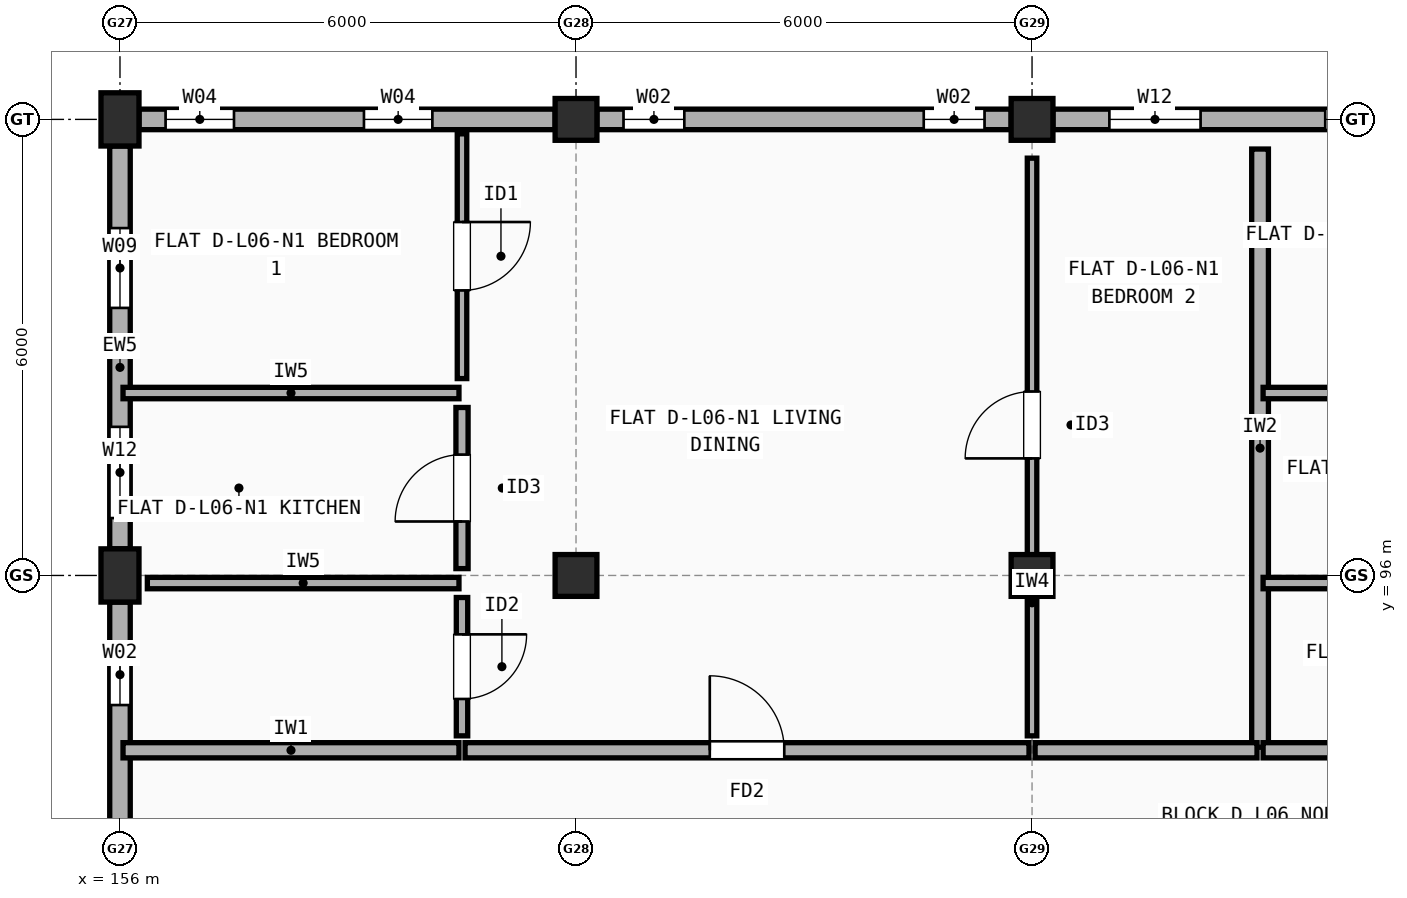
"""IFC4 building model, lengths in metres.
Left out: names, types, materials, properties, quantities, classifications, styles, units other than length and angle.
Written with IfcOpenShell. Run it as: python <this file> out.ifc"""

import sys

from ifc_helpers import new_model, si_unit, direction, frame, frame_2d, origin, origin_2d, place, context, subcontext, project, spatial, rectangle, extrude, element, fill, save


model = new_model("IFC4")
c1 = context("Model", 3, precision=1e-05, world=origin(), true_north=direction((0.0, 1.0)))
c2 = subcontext(c1, "Body", "Model", "MODEL_VIEW")
j1 = project(units=[si_unit("LENGTHUNIT", "METRE"), si_unit("PLANEANGLEUNIT", "RADIAN")], contexts=[c1])
p1 = place(None, origin())
s1 = spatial("IfcSite", under=j1, at=p1, CompositionType="ELEMENT")
p2 = place(p1, origin())
s2 = spatial("IfcBuilding", under=s1, at=p2, CompositionType="ELEMENT")
p3 = place(p2, frame((0.0, 0.0, 20.5)))
s3 = spatial("IfcBuildingStorey", under=s2, at=p3, CompositionType="ELEMENT", Elevation=20.5)
for number, where, z_axis, x_axis in (
    (1, (156.0, 96.0, 0.0), (0.0, 0.0, 1.0), (1.0, 0.0, 0.0)),
    (2, (156.0, 102.0, 0.0), (0.0, 0.0, 1.0), (1.0, 0.0, 0.0)),
):
    element("IfcColumn", number, at=place(p3, frame(where, z_axis=z_axis, x_axis=x_axis)), inside=s3, PredefinedType="COLUMN", context=c2, shape_type="SweptSolid", body=[
        extrude(rectangle(XDim=0.5, YDim=0.7, at=origin_2d()), origin(), (0.0, 0.0, 1.0), 2.97),
    ])
for number, where, z_axis, x_axis in (
    (3, (162.0, 96.0, 0.0), (0.0, 0.0, 1.0), (1.0, 0.0, 0.0)),
    (4, (162.0, 102.0, 0.0), (0.0, 0.0, 1.0), (1.0, 0.0, 0.0)),
    (5, (168.0, 96.0, 0.0), (0.0, 0.0, 1.0), (1.0, 0.0, 0.0)),
    (6, (168.0, 102.0, 0.0), (0.0, 0.0, 1.0), (1.0, 0.0, 0.0)),
):
    element("IfcColumn", number, at=place(p3, frame(where, z_axis=z_axis, x_axis=x_axis)), inside=s3, PredefinedType="COLUMN", context=c2, shape_type="SweptSolid", body=[
        extrude(rectangle(XDim=0.55, YDim=0.55, at=origin_2d()), origin(), (0.0, 0.0, 1.0), 2.97),
    ])
p4 = place(p3, frame((173.725, 102.0, 0.0), z_axis=(0.0, 0.0, 1.0), x_axis=(-1.0, 0.0, 0.0)))
e7 = element("IfcWall", 7, at=p4, inside=s3, PredefinedType="STANDARD", context=c2, shape_type="SweptSolid", body=[
    extrude(rectangle(XDim=5.45, YDim=0.27, at=frame_2d((2.725, 0.0))), origin(), (0.0, 0.0, 1.0), 2.452),
])
p5 = place(p4, frame((0.817, 0.0, 0.9)))
e8 = element("IfcOpeningElement", 8, at=p5, cuts=e7, PredefinedType="OPENING", context=c2, shape_type="SweptSolid", body=[
    extrude(rectangle(XDim=1.05, YDim=1.35, at=frame_2d((0.525, 0.675))), frame((0.0, 0.145, 0.0), z_axis=(0.0, -1.0, 0.0), x_axis=(1.0, 0.0, 0.0)), (0.0, 0.0, 1.0), 0.29),
])
p6 = place(p4, frame((3.508, 0.0, 0.9)))
e9 = element("IfcOpeningElement", 9, at=p6, cuts=e7, PredefinedType="OPENING", context=c2, shape_type="SweptSolid", body=[
    extrude(rectangle(XDim=1.2, YDim=1.35, at=frame_2d((0.6, 0.675))), frame((0.0, 0.145, 0.0), z_axis=(0.0, -1.0, 0.0), x_axis=(1.0, 0.0, 0.0)), (0.0, 0.0, 1.0), 0.29),
])
p7 = place(p3, frame((167.725, 102.0, 0.0), z_axis=(0.0, 0.0, 1.0), x_axis=(-1.0, 0.0, 0.0)))
e10 = element("IfcWall", 10, at=p7, inside=s3, PredefinedType="STANDARD", context=c2, shape_type="SweptSolid", body=[
    extrude(rectangle(XDim=5.45, YDim=0.27, at=frame_2d((2.725, 0.0))), origin(), (0.0, 0.0, 1.0), 2.452),
])
p8 = place(p7, frame((0.35, 0.0, 0.9)))
e11 = element("IfcOpeningElement", 11, at=p8, cuts=e10, PredefinedType="OPENING", context=c2, shape_type="SweptSolid", body=[
    extrude(rectangle(XDim=0.8, YDim=1.2, at=frame_2d((0.4, 0.6))), frame((0.0, 0.145, 0.0), z_axis=(0.0, -1.0, 0.0), x_axis=(1.0, 0.0, 0.0)), (0.0, 0.0, 1.0), 0.29),
])
p9 = place(p7, frame((4.3, 0.0, 0.9)))
e12 = element("IfcOpeningElement", 12, at=p9, cuts=e10, PredefinedType="OPENING", context=c2, shape_type="SweptSolid", body=[
    extrude(rectangle(XDim=0.8, YDim=1.2, at=frame_2d((0.4, 0.6))), frame((0.0, 0.145, 0.0), z_axis=(0.0, -1.0, 0.0), x_axis=(1.0, 0.0, 0.0)), (0.0, 0.0, 1.0), 0.29),
])
p10 = place(p3, frame((161.725, 102.0, 0.0), z_axis=(0.0, 0.0, 1.0), x_axis=(-1.0, 0.0, 0.0)))
e13 = element("IfcWall", 13, at=p10, inside=s3, PredefinedType="STANDARD", context=c2, shape_type="SweptSolid", body=[
    extrude(rectangle(XDim=5.475, YDim=0.27, at=frame_2d((2.738, 0.0))), origin(), (0.0, 0.0, 1.0), 2.452),
])
p11 = place(p10, frame((1.615, 0.0, 0.9)))
e14 = element("IfcOpeningElement", 14, at=p11, cuts=e13, PredefinedType="OPENING", context=c2, shape_type="SweptSolid", body=[
    extrude(rectangle(XDim=0.9, YDim=1.3, at=frame_2d((0.45, 0.65))), frame((0.0, 0.145, 0.0), z_axis=(0.0, -1.0, 0.0), x_axis=(1.0, 0.0, 0.0)), (0.0, 0.0, 1.0), 0.29),
])
p12 = place(p10, frame((4.225, 0.0, 0.9)))
e15 = element("IfcOpeningElement", 15, at=p12, cuts=e13, PredefinedType="OPENING", context=c2, shape_type="SweptSolid", body=[
    extrude(rectangle(XDim=0.9, YDim=1.3, at=frame_2d((0.45, 0.65))), frame((0.0, 0.145, 0.0), z_axis=(0.0, -1.0, 0.0), x_axis=(1.0, 0.0, 0.0)), (0.0, 0.0, 1.0), 0.29),
])
p13 = place(p3, frame((156.0, 101.65, 0.0), z_axis=(0.0, 0.0, 1.0), x_axis=(0.0, -1.0, 0.0)))
e16 = element("IfcWall", 16, at=p13, inside=s3, PredefinedType="STANDARD", context=c2, shape_type="SweptSolid", body=[
    extrude(rectangle(XDim=5.3, YDim=0.27, at=frame_2d((2.65, 0.0))), origin(), (0.0, 0.0, 1.0), 2.452),
])
p14 = place(p13, frame((1.08, 0.0, 0.9)))
e17 = element("IfcOpeningElement", 17, at=p14, cuts=e16, PredefinedType="OPENING", context=c2, shape_type="SweptSolid", body=[
    extrude(rectangle(XDim=1.05, YDim=1.35, at=frame_2d((0.525, 0.675))), frame((0.0, 0.145, 0.0), z_axis=(0.0, -1.0, 0.0), x_axis=(1.0, 0.0, 0.0)), (0.0, 0.0, 1.0), 0.29),
])
p15 = place(p13, frame((3.695, 0.0, 0.9)))
e18 = element("IfcOpeningElement", 18, at=p15, cuts=e16, PredefinedType="OPENING", context=c2, shape_type="SweptSolid", body=[
    extrude(rectangle(XDim=1.2, YDim=1.35, at=frame_2d((0.6, 0.675))), frame((0.0, 0.145, 0.0), z_axis=(0.0, -1.0, 0.0), x_axis=(1.0, 0.0, 0.0)), (0.0, 0.0, 1.0), 0.29),
])
p16 = place(p3, frame((156.0, 95.65, 0.0), z_axis=(0.0, 0.0, 1.0), x_axis=(0.0, -1.0, 0.0)))
e19 = element("IfcWall", 19, at=p16, inside=s3, PredefinedType="STANDARD", context=c2, shape_type="SweptSolid", body=[
    extrude(rectangle(XDim=5.3, YDim=0.27, at=frame_2d((2.65, 0.0))), origin(), (0.0, 0.0, 1.0), 2.452),
])
p17 = place(p16, frame((0.555, 0.0, 0.9)))
e20 = element("IfcOpeningElement", 20, at=p17, cuts=e19, PredefinedType="OPENING", context=c2, shape_type="SweptSolid", body=[
    extrude(rectangle(XDim=0.8, YDim=1.2, at=frame_2d((0.4, 0.6))), frame((0.0, 0.145, 0.0), z_axis=(0.0, -1.0, 0.0), x_axis=(1.0, 0.0, 0.0)), (0.0, 0.0, 1.0), 0.29),
])
p18 = place(p16, frame((3.22, 0.0, 0.9)))
e21 = element("IfcOpeningElement", 21, at=p18, cuts=e19, PredefinedType="OPENING", context=c2, shape_type="SweptSolid", body=[
    extrude(rectangle(XDim=0.85, YDim=1.25, at=frame_2d((0.425, 0.625))), frame((0.0, 0.145, 0.0), z_axis=(0.0, -1.0, 0.0), x_axis=(1.0, 0.0, 0.0)), (0.0, 0.0, 1.0), 0.29),
])
p19 = place(p3, frame((171.0, 93.74, 0.0), z_axis=(0.0, 0.0, 1.0), x_axis=(0.0, 1.0, 0.0)))
e22 = element("IfcWall", 22, at=p19, inside=s3, PredefinedType="SOLIDWALL", context=c2, shape_type="SweptSolid", body=[
    extrude(rectangle(XDim=7.87, YDim=0.22, at=frame_2d((3.935, 0.0))), origin(), (0.0, 0.0, 1.0), 2.508),
])
p20 = place(p3, frame((156.04, 93.7, 0.0), z_axis=(0.0, 0.0, 1.0), x_axis=(1.0, 0.0, 0.0)))
e23 = element("IfcWall", 23, at=p20, inside=s3, PredefinedType="SOLIDWALL", context=c2, shape_type="SweptSolid", body=[
    extrude(rectangle(XDim=4.42, YDim=0.2, at=frame_2d((2.21, 0.0))), origin(), (0.0, 0.0, 1.0), 2.452),
])
p21 = place(p3, frame((160.54, 93.7, 0.0), z_axis=(0.0, 0.0, 1.0), x_axis=(1.0, 0.0, 0.0)))
e24 = element("IfcWall", 24, at=p21, inside=s3, PredefinedType="SOLIDWALL", context=c2, shape_type="SweptSolid", body=[
    extrude(rectangle(XDim=7.42, YDim=0.2, at=frame_2d((3.71, 0.0))), origin(), (0.0, 0.0, 1.0), 2.508),
])
p22 = place(p21, frame((3.22, 0.0, 0.0)))
e25 = element("IfcOpeningElement", 25, at=p22, cuts=e24, PredefinedType="OPENING", context=c2, shape_type="SweptSolid", body=[
    extrude(rectangle(XDim=0.98, YDim=2.15, at=frame_2d((0.49, 1.075))), frame((0.0, 0.11, 0.0), z_axis=(0.0, -1.0, 0.0), x_axis=(1.0, 0.0, 0.0)), (0.0, 0.0, 1.0), 0.22),
])
p23 = place(p3, frame((160.5, 98.59, 0.0), z_axis=(0.0, 0.0, 1.0), x_axis=(0.0, 1.0, 0.0)))
e26 = element("IfcWall", 26, at=p23, inside=s3, PredefinedType="PARTITIONING", context=c2, shape_type="SweptSolid", body=[
    extrude(rectangle(XDim=3.22, YDim=0.125, at=frame_2d((1.61, 0.0))), origin(), (0.0, 0.0, 1.0), 2.97),
])
p24 = place(p23, frame((1.16, 0.0, 0.0)))
e27 = element("IfcOpeningElement", 27, at=p24, cuts=e26, PredefinedType="OPENING", context=c2, shape_type="SweptSolid", body=[
    extrude(rectangle(XDim=0.9, YDim=2.1, at=frame_2d((0.45, 1.05))), frame((0.0, 0.073, 0.0), z_axis=(0.0, -1.0, 0.0), x_axis=(1.0, 0.0, 0.0)), (0.0, 0.0, 1.0), 0.145),
])
p25 = place(p3, frame((160.5, 96.09, 0.0), z_axis=(0.0, 0.0, 1.0), x_axis=(0.0, 1.0, 0.0)))
e28 = element("IfcWall", 28, at=p25, inside=s3, PredefinedType="PLUMBINGWALL", context=c2, shape_type="SweptSolid", body=[
    extrude(rectangle(XDim=2.12, YDim=0.16, at=frame_2d((1.06, 0.0))), origin(), (0.0, 0.0, 1.0), 2.408),
])
p26 = place(p25, frame((0.62, 0.0, 0.0)))
e29 = element("IfcOpeningElement", 29, at=p26, cuts=e28, PredefinedType="OPENING", context=c2, shape_type="SweptSolid", body=[
    extrude(rectangle(XDim=0.88, YDim=2.1, at=frame_2d((0.44, 1.05))), frame((0.0, 0.09, 0.0), z_axis=(0.0, -1.0, 0.0), x_axis=(1.0, 0.0, 0.0)), (0.0, 0.0, 1.0), 0.18),
])
p27 = place(p3, frame((160.5, 93.89, 0.0), z_axis=(0.0, 0.0, 1.0), x_axis=(0.0, 1.0, 0.0)))
e30 = element("IfcWall", 30, at=p27, inside=s3, PredefinedType="PARTITIONING", context=c2, shape_type="SweptSolid", body=[
    extrude(rectangle(XDim=1.82, YDim=0.15, at=frame_2d((0.91, 0.0))), origin(), (0.0, 0.0, 1.0), 2.97),
])
p28 = place(p27, frame((0.485, 0.0, 0.0)))
e31 = element("IfcOpeningElement", 31, at=p28, cuts=e30, PredefinedType="OPENING", context=c2, shape_type="SweptSolid", body=[
    extrude(rectangle(XDim=0.85, YDim=2.1, at=frame_2d((0.425, 1.05))), frame((0.0, 0.085, 0.0), z_axis=(0.0, -1.0, 0.0), x_axis=(1.0, 0.0, 0.0)), (0.0, 0.0, 1.0), 0.17),
])
p29 = place(p3, frame((156.04, 98.4, 0.0), z_axis=(0.0, 0.0, 1.0), x_axis=(1.0, 0.0, 0.0)))
e32 = element("IfcWall", 32, at=p29, inside=s3, PredefinedType="PARTITIONING", context=c2, shape_type="SweptSolid", body=[
    extrude(rectangle(XDim=4.42, YDim=0.15, at=frame_2d((2.21, 0.0))), origin(), (0.0, 0.0, 1.0), 2.452),
])
p30 = place(p3, frame((156.36, 95.9, 0.0), z_axis=(0.0, 0.0, 1.0), x_axis=(1.0, 0.0, 0.0)))
e33 = element("IfcWall", 33, at=p30, inside=s3, PredefinedType="PARTITIONING", context=c2, shape_type="SweptSolid", body=[
    extrude(rectangle(XDim=4.1, YDim=0.15, at=frame_2d((2.05, 0.0))), origin(), (0.0, 0.0, 1.0), 2.408),
])
p31 = place(p3, frame((168.04, 93.7, 0.0), z_axis=(0.0, 0.0, 1.0), x_axis=(1.0, 0.0, 0.0)))
e34 = element("IfcWall", 34, at=p31, inside=s3, PredefinedType="SOLIDWALL", context=c2, shape_type="SweptSolid", body=[
    extrude(rectangle(XDim=2.92, YDim=0.2, at=frame_2d((1.46, 0.0))), origin(), (0.0, 0.0, 1.0), 2.508),
])
p32 = place(p3, frame((168.0, 93.89, 0.0), z_axis=(0.0, 0.0, 1.0), x_axis=(0.0, 1.0, 0.0)))
e35 = element("IfcWall", 35, at=p32, inside=s3, PredefinedType="PARTITIONING", context=c2, shape_type="SweptSolid", body=[
    extrude(rectangle(XDim=7.6, YDim=0.125, at=frame_2d((3.8, 0.0))), origin(), (0.0, 0.0, 1.0), 2.508),
])
p33 = place(p32, frame((3.65, 0.0, 0.0)))
e36 = element("IfcOpeningElement", 36, at=p33, cuts=e35, PredefinedType="OPENING", context=c2, shape_type="SweptSolid", body=[
    extrude(rectangle(XDim=0.88, YDim=2.1, at=frame_2d((0.44, 1.05))), frame((0.0, 0.073, 0.0), z_axis=(0.0, -1.0, 0.0), x_axis=(1.0, 0.0, 0.0)), (0.0, 0.0, 1.0), 0.145),
])
p34 = place(p3, frame((171.04, 93.7, 0.0), z_axis=(0.0, 0.0, 1.0), x_axis=(1.0, 0.0, 0.0)))
e37 = element("IfcWall", 37, at=p34, inside=s3, PredefinedType="SOLIDWALL", context=c2, shape_type="SweptSolid", body=[
    extrude(rectangle(XDim=4.42, YDim=0.2, at=frame_2d((2.21, 0.0))), origin(), (0.0, 0.0, 1.0), 2.97),
])
p35 = place(p3, frame((171.04, 98.4, 0.0), z_axis=(0.0, 0.0, 1.0), x_axis=(1.0, 0.0, 0.0)))
e38 = element("IfcWall", 38, at=p35, inside=s3, PredefinedType="PARTITIONING", context=c2, shape_type="SweptSolid", body=[
    extrude(rectangle(XDim=4.42, YDim=0.15, at=frame_2d((2.21, 0.0))), origin(), (0.0, 0.0, 1.0), 2.508),
])
p36 = place(p3, frame((171.04, 95.9, 0.0), z_axis=(0.0, 0.0, 1.0), x_axis=(1.0, 0.0, 0.0)))
e39 = element("IfcWall", 39, at=p36, inside=s3, PredefinedType="PARTITIONING", context=c2, shape_type="SweptSolid", body=[
    extrude(rectangle(XDim=4.42, YDim=0.15, at=frame_2d((2.21, 0.0))), origin(), (0.0, 0.0, 1.0), 2.408),
])
p37 = place(p5, origin())
e40 = element("IfcWindow", 40, at=p37, inside=s3, PartitioningType="SINGLE_PANEL", PredefinedType="WINDOW", context=c2, shape_type="SweptSolid", body=[
    extrude(rectangle(XDim=1.05, YDim=1.35, at=frame_2d((0.525, 0.675))), frame((0.0, 0.03, 0.0), z_axis=(0.0, -1.0, 0.0), x_axis=(1.0, 0.0, 0.0)), (0.0, 0.0, 1.0), 0.06),
])
fill(e8, e40)
p38 = place(p6, origin())
e41 = element("IfcWindow", 41, at=p38, inside=s3, PartitioningType="SINGLE_PANEL", PredefinedType="WINDOW", context=c2, shape_type="SweptSolid", body=[
    extrude(rectangle(XDim=1.2, YDim=1.35, at=frame_2d((0.6, 0.675))), frame((0.0, 0.03, 0.0), z_axis=(0.0, -1.0, 0.0), x_axis=(1.0, 0.0, 0.0)), (0.0, 0.0, 1.0), 0.06),
])
fill(e9, e41)
p39 = place(p8, origin())
e42 = element("IfcWindow", 42, at=p39, inside=s3, PartitioningType="SINGLE_PANEL", PredefinedType="WINDOW", context=c2, shape_type="SweptSolid", body=[
    extrude(rectangle(XDim=0.8, YDim=1.2, at=frame_2d((0.4, 0.6))), frame((0.0, 0.03, 0.0), z_axis=(0.0, -1.0, 0.0), x_axis=(1.0, 0.0, 0.0)), (0.0, 0.0, 1.0), 0.06),
])
fill(e11, e42)
p40 = place(p9, origin())
e43 = element("IfcWindow", 43, at=p40, inside=s3, PartitioningType="SINGLE_PANEL", PredefinedType="WINDOW", context=c2, shape_type="SweptSolid", body=[
    extrude(rectangle(XDim=0.8, YDim=1.2, at=frame_2d((0.4, 0.6))), frame((0.0, 0.03, 0.0), z_axis=(0.0, -1.0, 0.0), x_axis=(1.0, 0.0, 0.0)), (0.0, 0.0, 1.0), 0.06),
])
fill(e12, e43)
p41 = place(p11, origin())
e44 = element("IfcWindow", 44, at=p41, inside=s3, PartitioningType="SINGLE_PANEL", PredefinedType="WINDOW", context=c2, shape_type="SweptSolid", body=[
    extrude(rectangle(XDim=0.9, YDim=1.3, at=frame_2d((0.45, 0.65))), frame((0.0, 0.03, 0.0), z_axis=(0.0, -1.0, 0.0), x_axis=(1.0, 0.0, 0.0)), (0.0, 0.0, 1.0), 0.06),
])
fill(e14, e44)
p42 = place(p12, origin())
e45 = element("IfcWindow", 45, at=p42, inside=s3, PartitioningType="SINGLE_PANEL", PredefinedType="WINDOW", context=c2, shape_type="SweptSolid", body=[
    extrude(rectangle(XDim=0.9, YDim=1.3, at=frame_2d((0.45, 0.65))), frame((0.0, 0.03, 0.0), z_axis=(0.0, -1.0, 0.0), x_axis=(1.0, 0.0, 0.0)), (0.0, 0.0, 1.0), 0.06),
])
fill(e15, e45)
p43 = place(p14, origin())
e46 = element("IfcWindow", 46, at=p43, inside=s3, PartitioningType="SINGLE_PANEL", PredefinedType="WINDOW", context=c2, shape_type="SweptSolid", body=[
    extrude(rectangle(XDim=1.05, YDim=1.35, at=frame_2d((0.525, 0.675))), frame((0.0, 0.03, 0.0), z_axis=(0.0, -1.0, 0.0), x_axis=(1.0, 0.0, 0.0)), (0.0, 0.0, 1.0), 0.06),
])
fill(e17, e46)
p44 = place(p15, origin())
e47 = element("IfcWindow", 47, at=p44, inside=s3, PartitioningType="SINGLE_PANEL", PredefinedType="WINDOW", context=c2, shape_type="SweptSolid", body=[
    extrude(rectangle(XDim=1.2, YDim=1.35, at=frame_2d((0.6, 0.675))), frame((0.0, 0.03, 0.0), z_axis=(0.0, -1.0, 0.0), x_axis=(1.0, 0.0, 0.0)), (0.0, 0.0, 1.0), 0.06),
])
fill(e18, e47)
p45 = place(p17, origin())
e48 = element("IfcWindow", 48, at=p45, inside=s3, PartitioningType="SINGLE_PANEL", PredefinedType="WINDOW", context=c2, shape_type="SweptSolid", body=[
    extrude(rectangle(XDim=0.8, YDim=1.2, at=frame_2d((0.4, 0.6))), frame((0.0, 0.03, 0.0), z_axis=(0.0, -1.0, 0.0), x_axis=(1.0, 0.0, 0.0)), (0.0, 0.0, 1.0), 0.06),
])
fill(e20, e48)
p46 = place(p22, origin())
e49 = element("IfcDoor", 49, at=p46, inside=s3, OperationType="SINGLE_SWING_LEFT", PredefinedType="DOOR", context=c2, shape_type="SweptSolid", body=[
    extrude(rectangle(XDim=0.98, YDim=2.15, at=frame_2d((0.49, 1.075))), frame((0.0, 0.025, 0.0), z_axis=(0.0, -1.0, 0.0), x_axis=(1.0, 0.0, 0.0)), (0.0, 0.0, 1.0), 0.05),
])
fill(e25, e49)
p47 = place(p24, origin())
e50 = element("IfcDoor", 50, at=p47, inside=s3, OperationType="SINGLE_SWING_RIGHT", PredefinedType="DOOR", context=c2, shape_type="SweptSolid", body=[
    extrude(rectangle(XDim=0.9, YDim=2.1, at=frame_2d((0.45, 1.05))), frame((0.0, 0.025, 0.0), z_axis=(0.0, -1.0, 0.0), x_axis=(1.0, 0.0, 0.0)), (0.0, 0.0, 1.0), 0.05),
])
fill(e27, e50)
p48 = place(p26, origin())
e51 = element("IfcDoor", 51, at=p48, inside=s3, OperationType="SINGLE_SWING_LEFT", PredefinedType="DOOR", context=c2, shape_type="SweptSolid", body=[
    extrude(rectangle(XDim=0.88, YDim=2.1, at=frame_2d((0.44, 1.05))), frame((0.0, 0.025, 0.0), z_axis=(0.0, -1.0, 0.0), x_axis=(1.0, 0.0, 0.0)), (0.0, 0.0, 1.0), 0.05),
])
fill(e29, e51)
p49 = place(p28, origin())
e52 = element("IfcDoor", 52, at=p49, inside=s3, OperationType="SINGLE_SWING_RIGHT", PredefinedType="DOOR", context=c2, shape_type="SweptSolid", body=[
    extrude(rectangle(XDim=0.85, YDim=2.1, at=frame_2d((0.425, 1.05))), frame((0.0, 0.025, 0.0), z_axis=(0.0, -1.0, 0.0), x_axis=(1.0, 0.0, 0.0)), (0.0, 0.0, 1.0), 0.05),
])
fill(e31, e52)
p50 = place(p33, origin())
e53 = element("IfcDoor", 53, at=p50, inside=s3, OperationType="SINGLE_SWING_LEFT", PredefinedType="DOOR", context=c2, shape_type="SweptSolid", body=[
    extrude(rectangle(XDim=0.88, YDim=2.1, at=frame_2d((0.44, 1.05))), frame((0.0, 0.025, 0.0), z_axis=(0.0, -1.0, 0.0), x_axis=(1.0, 0.0, 0.0)), (0.0, 0.0, 1.0), 0.05),
])
fill(e36, e53)
save(model, sys.argv[1])
